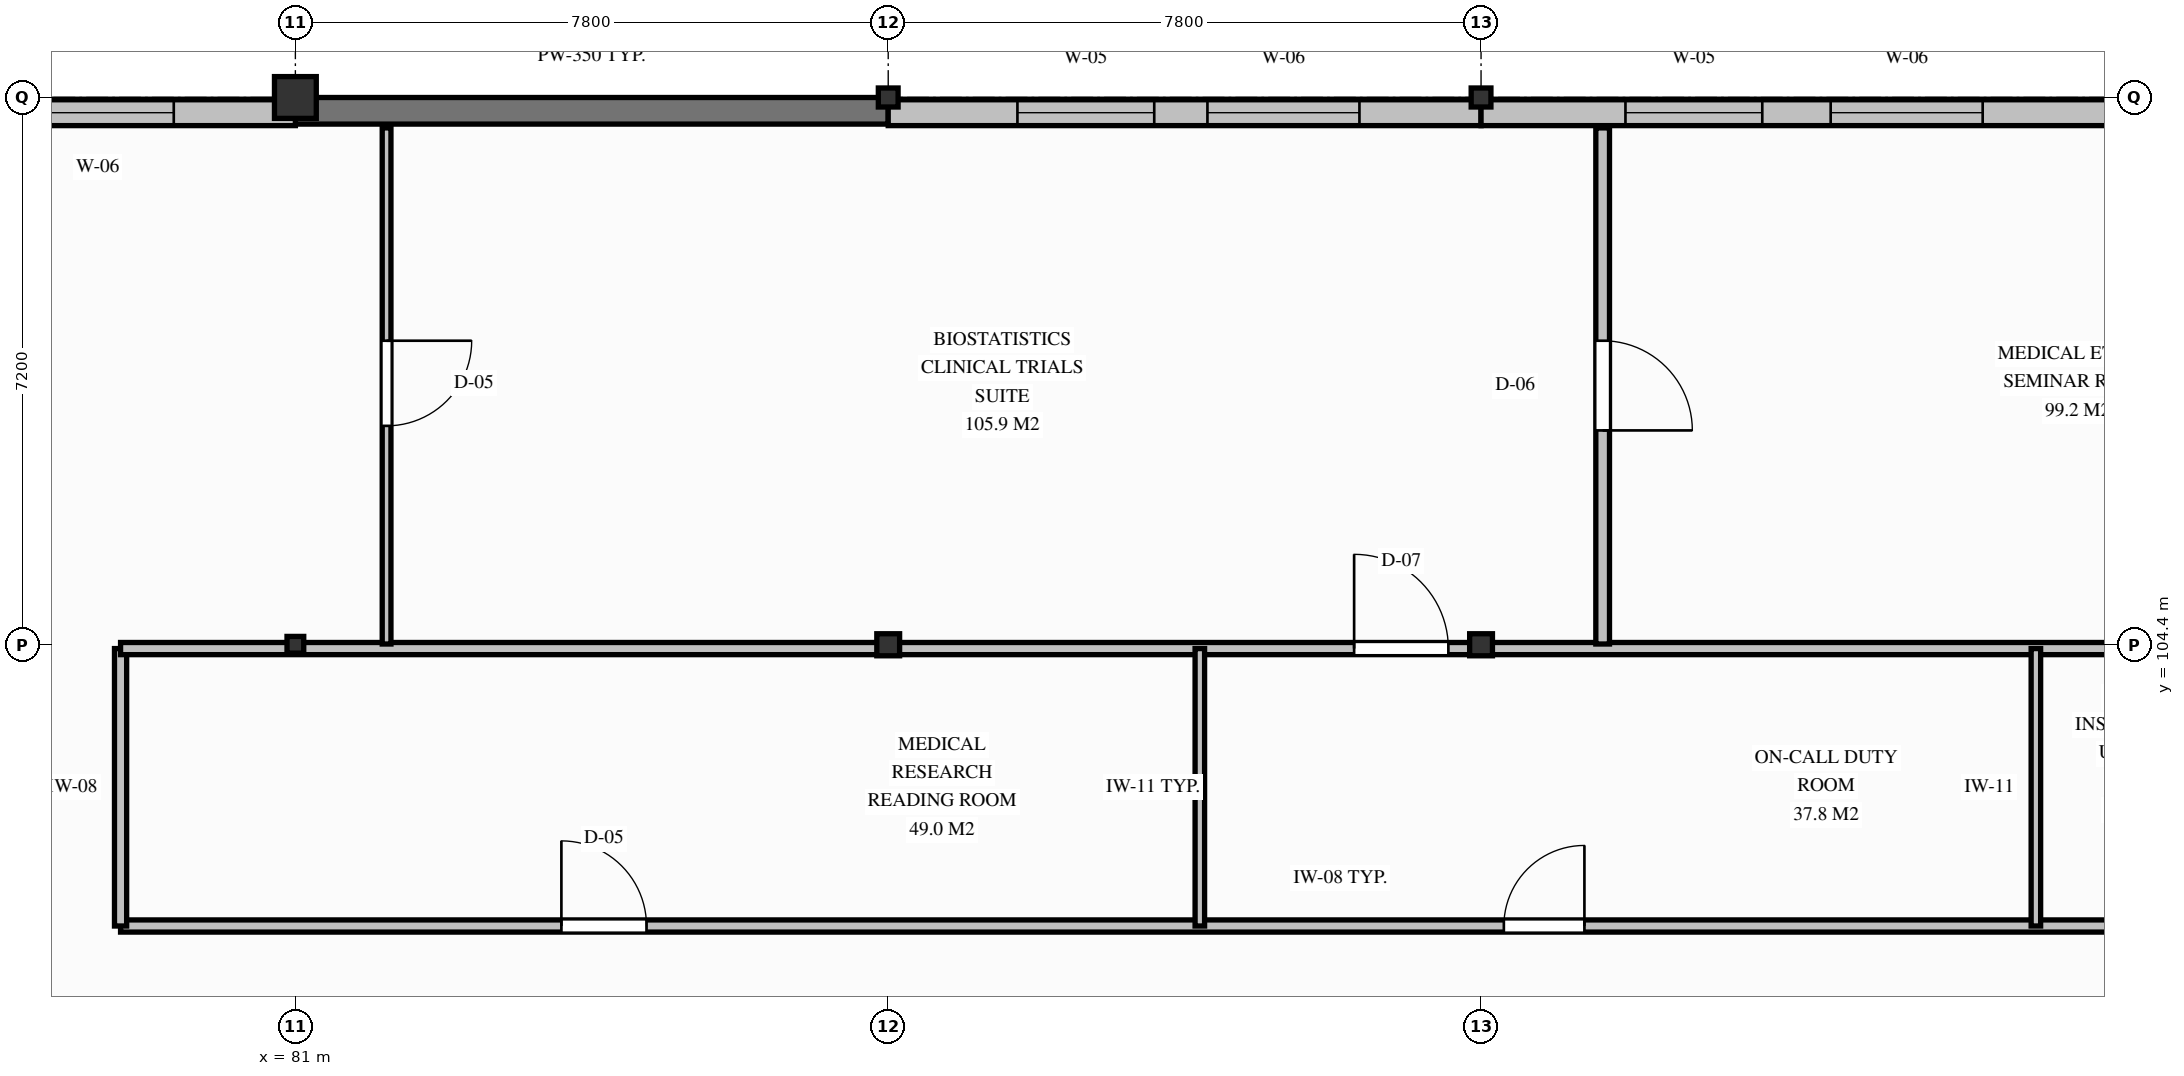
"""IFC4 building model, lengths in metres.
Left out: names, types, materials, properties, quantities, classifications, styles, units other than length and angle.
Written with IfcOpenShell. Run it as: python <this file> out.ifc"""

import sys

from ifc_helpers import new_model, si_unit, direction, frame, frame_2d, origin, origin_2d, place, context, subcontext, project, spatial, rectangle, hollow_rectangle, i_section, extrude, element, fill, save


model = new_model("IFC4")
c1 = context("Model", 3, precision=1e-05, world=origin(), true_north=direction((0.0, 1.0)))
c2 = subcontext(c1, "Body", "Model", "MODEL_VIEW")
j1 = project(units=[si_unit("LENGTHUNIT", "METRE"), si_unit("PLANEANGLEUNIT", "RADIAN")], contexts=[c1])
p1 = place(None, origin())
s1 = spatial("IfcSite", under=j1, at=p1, CompositionType="ELEMENT")
p2 = place(p1, origin())
s2 = spatial("IfcBuilding", under=s1, at=p2, CompositionType="ELEMENT")
p3 = place(p2, frame((0.0, 0.0, 25.35)))
s3 = spatial("IfcBuildingStorey", under=s2, at=p3, CompositionType="ELEMENT", Elevation=25.35)
p4 = place(p3, frame((81.0, 111.425, 0.0), z_axis=(0.0, 0.0, 1.0), x_axis=(1.0, 0.0, 0.0)))
e1 = element("IfcWall", 1, at=p4, inside=s3, PredefinedType="SHEAR", context=c2, shape_type="SweptSolid", body=[
    extrude(rectangle(XDim=7.8, YDim=0.35, at=frame_2d((3.9, 0.0))), origin(), (0.0, 0.0, 1.0), 4.05),
])
p5 = place(p3, frame((81.0, 104.4, 0.0), z_axis=(0.0, 0.0, 1.0), x_axis=(1.0, 0.0, 0.0)))
e2 = element("IfcColumn", 2, at=p5, inside=s3, PredefinedType="COLUMN", context=c2, shape_type="SweptSolid", body=[
    extrude(hollow_rectangle(XDim=0.22, YDim=0.22, WallThickness=0.012, InnerFilletRadius=0.019, OuterFilletRadius=0.031, at=origin_2d()), origin(), (0.0, 0.0, 1.0), 4.05),
])
p6 = place(p3, frame((81.0, 111.6, 0.0), z_axis=(0.0, 0.0, 1.0), x_axis=(1.0, 0.0, 0.0)))
e3 = element("IfcColumn", 3, at=p6, inside=s3, PredefinedType="COLUMN", context=c2, shape_type="SweptSolid", body=[
    extrude(rectangle(XDim=0.55, YDim=0.55, at=origin_2d()), origin(), (0.0, 0.0, 1.0), 4.05),
])
p7 = place(p3, frame((88.8, 104.4, 0.0), z_axis=(0.0, 0.0, 1.0), x_axis=(1.0, 0.0, 0.0)))
e4 = element("IfcColumn", 4, at=p7, inside=s3, PredefinedType="COLUMN", context=c2, shape_type="SweptSolid", body=[
    extrude(i_section(OverallWidth=0.3, OverallDepth=0.29, WebThickness=0.009, FlangeThickness=0.014, FilletRadius=0.027, at=origin_2d()), origin(), (0.0, 0.0, 1.0), 4.05),
])
p8 = place(p3, frame((88.8, 111.6, 0.0), z_axis=(0.0, 0.0, 1.0), x_axis=(1.0, 0.0, 0.0)))
e5 = element("IfcColumn", 5, at=p8, inside=s3, PredefinedType="COLUMN", context=c2, shape_type="SweptSolid", body=[
    extrude(i_section(OverallWidth=0.26, OverallDepth=0.25, WebThickness=0.008, FlangeThickness=0.012, FilletRadius=0.024, at=origin_2d()), origin(), (0.0, 0.0, 1.0), 4.05),
])
p9 = place(p3, frame((96.6, 104.4, 0.0), z_axis=(0.0, 0.0, 1.0), x_axis=(1.0, 0.0, 0.0)))
e6 = element("IfcColumn", 6, at=p9, inside=s3, PredefinedType="COLUMN", context=c2, shape_type="SweptSolid", body=[
    extrude(i_section(OverallWidth=0.3, OverallDepth=0.29, WebThickness=0.009, FlangeThickness=0.014, FilletRadius=0.027, at=origin_2d()), origin(), (0.0, 0.0, 1.0), 4.05),
])
p10 = place(p3, frame((96.6, 111.6, 0.0), z_axis=(0.0, 0.0, 1.0), x_axis=(1.0, 0.0, 0.0)))
e7 = element("IfcColumn", 7, at=p10, inside=s3, PredefinedType="COLUMN", context=c2, shape_type="SweptSolid", body=[
    extrude(i_section(OverallWidth=0.26, OverallDepth=0.25, WebThickness=0.008, FlangeThickness=0.012, FilletRadius=0.024, at=origin_2d()), origin(), (0.0, 0.0, 1.0), 4.05),
])
p11 = place(p3, frame((73.2, 111.4, 0.0), z_axis=(0.0, 0.0, 1.0), x_axis=(1.0, 0.0, 0.0)))
e8 = element("IfcWall", 8, at=p11, inside=s3, PredefinedType="SOLIDWALL", context=c2, shape_type="SweptSolid", body=[
    extrude(rectangle(XDim=7.8, YDim=0.34, at=frame_2d((3.9, 0.0))), origin(), (0.0, 0.0, 1.0), 3.188),
])
p12 = place(p11, frame((1.7, 0.0, 0.85)))
e9 = element("IfcOpeningElement", 9, at=p12, cuts=e8, PredefinedType="OPENING", context=c2, shape_type="SweptSolid", body=[
    extrude(rectangle(XDim=1.8, YDim=1.95, at=frame_2d((0.9, 0.975))), frame((0.0, 0.18, 0.0), z_axis=(0.0, -1.0, 0.0), x_axis=(1.0, 0.0, 0.0)), (0.0, 0.0, 1.0), 0.36),
])
p13 = place(p11, frame((4.2, 0.0, 0.85)))
e10 = element("IfcOpeningElement", 10, at=p13, cuts=e8, PredefinedType="OPENING", context=c2, shape_type="SweptSolid", body=[
    extrude(rectangle(XDim=2.0, YDim=1.95, at=frame_2d((1.0, 0.975))), frame((0.0, 0.18, 0.0), z_axis=(0.0, -1.0, 0.0), x_axis=(1.0, 0.0, 0.0)), (0.0, 0.0, 1.0), 0.36),
])
p14 = place(p3, frame((88.8, 111.4, 0.0), z_axis=(0.0, 0.0, 1.0), x_axis=(1.0, 0.0, 0.0)))
e11 = element("IfcWall", 11, at=p14, inside=s3, PredefinedType="SOLIDWALL", context=c2, shape_type="SweptSolid", body=[
    extrude(rectangle(XDim=7.8, YDim=0.34, at=frame_2d((3.9, 0.0))), origin(), (0.0, 0.0, 1.0), 3.338),
])
p15 = place(p14, frame((1.7, 0.0, 0.85)))
e12 = element("IfcOpeningElement", 12, at=p15, cuts=e11, PredefinedType="OPENING", context=c2, shape_type="SweptSolid", body=[
    extrude(rectangle(XDim=1.8, YDim=1.95, at=frame_2d((0.9, 0.975))), frame((0.0, 0.18, 0.0), z_axis=(0.0, -1.0, 0.0), x_axis=(1.0, 0.0, 0.0)), (0.0, 0.0, 1.0), 0.36),
])
p16 = place(p14, frame((4.2, 0.0, 0.85)))
e13 = element("IfcOpeningElement", 13, at=p16, cuts=e11, PredefinedType="OPENING", context=c2, shape_type="SweptSolid", body=[
    extrude(rectangle(XDim=2.0, YDim=1.95, at=frame_2d((1.0, 0.975))), frame((0.0, 0.18, 0.0), z_axis=(0.0, -1.0, 0.0), x_axis=(1.0, 0.0, 0.0)), (0.0, 0.0, 1.0), 0.36),
])
p17 = place(p3, frame((96.6, 111.4, 0.0), z_axis=(0.0, 0.0, 1.0), x_axis=(1.0, 0.0, 0.0)))
e14 = element("IfcWall", 14, at=p17, inside=s3, PredefinedType="SOLIDWALL", context=c2, shape_type="SweptSolid", body=[
    extrude(rectangle(XDim=8.4, YDim=0.34, at=frame_2d((4.2, 0.0))), origin(), (0.0, 0.0, 1.0), 3.388),
])
p18 = place(p17, frame((1.9, 0.0, 0.85)))
e15 = element("IfcOpeningElement", 15, at=p18, cuts=e14, PredefinedType="OPENING", context=c2, shape_type="SweptSolid", body=[
    extrude(rectangle(XDim=1.8, YDim=1.95, at=frame_2d((0.9, 0.975))), frame((0.0, 0.18, 0.0), z_axis=(0.0, -1.0, 0.0), x_axis=(1.0, 0.0, 0.0)), (0.0, 0.0, 1.0), 0.36),
])
p19 = place(p17, frame((4.6, 0.0, 0.85)))
e16 = element("IfcOpeningElement", 16, at=p19, cuts=e14, PredefinedType="OPENING", context=c2, shape_type="SweptSolid", body=[
    extrude(rectangle(XDim=2.0, YDim=1.95, at=frame_2d((1.0, 0.975))), frame((0.0, 0.18, 0.0), z_axis=(0.0, -1.0, 0.0), x_axis=(1.0, 0.0, 0.0)), (0.0, 0.0, 1.0), 0.36),
])
p20 = place(p3, frame((78.7, 100.7, 0.0), z_axis=(0.0, 0.0, 1.0), x_axis=(1.0, 0.0, 0.0)))
e17 = element("IfcWall", 17, at=p20, inside=s3, PredefinedType="PARTITIONING", context=c2, shape_type="SweptSolid", body=[
    extrude(rectangle(XDim=36.2, YDim=0.16, at=frame_2d((18.1, 0.0))), origin(), (0.0, 0.0, 1.0), 3.448),
])
p21 = place(p20, frame((5.8, 0.0, 0.0)))
e18 = element("IfcOpeningElement", 18, at=p21, cuts=e17, PredefinedType="OPENING", context=c2, shape_type="SweptSolid", body=[
    extrude(rectangle(XDim=1.12, YDim=2.18, at=frame_2d((0.56, 1.09))), frame((0.0, 0.09, 0.0), z_axis=(0.0, -1.0, 0.0), x_axis=(1.0, 0.0, 0.0)), (0.0, 0.0, 1.0), 0.18),
])
p22 = place(p20, frame((18.2, 0.0, 0.0)))
e19 = element("IfcOpeningElement", 19, at=p22, cuts=e17, PredefinedType="OPENING", context=c2, shape_type="SweptSolid", body=[
    extrude(rectangle(XDim=1.06, YDim=2.16, at=frame_2d((0.53, 1.08))), frame((0.0, 0.09, 0.0), z_axis=(0.0, -1.0, 0.0), x_axis=(1.0, 0.0, 0.0)), (0.0, 0.0, 1.0), 0.18),
])
p23 = place(p20, frame((29.2, 0.0, 0.0)))
e20 = element("IfcOpeningElement", 20, at=p23, cuts=e17, PredefinedType="OPENING", context=c2, shape_type="SweptSolid", body=[
    extrude(rectangle(XDim=1.36, YDim=2.2, at=frame_2d((0.68, 1.1))), frame((0.0, 0.09, 0.0), z_axis=(0.0, -1.0, 0.0), x_axis=(1.0, 0.0, 0.0)), (0.0, 0.0, 1.0), 0.18),
])
p24 = place(p3, frame((78.7, 100.7, 0.0), z_axis=(0.0, 0.0, 1.0), x_axis=(0.0, 1.0, 0.0)))
e21 = element("IfcWall", 21, at=p24, inside=s3, PredefinedType="PARTITIONING", context=c2, shape_type="SweptSolid", body=[
    extrude(rectangle(XDim=3.65, YDim=0.16, at=frame_2d((1.825, 0.0))), origin(), (0.0, 0.0, 1.0), 3.388),
])
p25 = place(p3, frame((78.7, 104.35, 0.0), z_axis=(0.0, 0.0, 1.0), x_axis=(1.0, 0.0, 0.0)))
e22 = element("IfcWall", 22, at=p25, inside=s3, PredefinedType="PARTITIONING", context=c2, shape_type="SweptSolid", body=[
    extrude(rectangle(XDim=36.2, YDim=0.16, at=frame_2d((18.1, 0.0))), origin(), (0.0, 0.0, 1.0), 3.188),
])
p26 = place(p25, frame((16.23, 0.0, 0.0)))
e23 = element("IfcOpeningElement", 23, at=p26, cuts=e22, PredefinedType="OPENING", context=c2, shape_type="SweptSolid", body=[
    extrude(rectangle(XDim=1.24, YDim=2.2, at=frame_2d((0.62, 1.1))), frame((0.0, 0.09, 0.0), z_axis=(0.0, -1.0, 0.0), x_axis=(1.0, 0.0, 0.0)), (0.0, 0.0, 1.0), 0.18),
])
p27 = place(p3, frame((92.9, 100.7, 0.0), z_axis=(0.0, 0.0, 1.0), x_axis=(0.0, 1.0, 0.0)))
e24 = element("IfcWall", 24, at=p27, inside=s3, PredefinedType="PARTITIONING", context=c2, shape_type="SweptSolid", body=[
    extrude(rectangle(XDim=3.65, YDim=0.125, at=frame_2d((1.825, 0.0))), origin(), (0.0, 0.0, 1.0), 3.398),
])
p28 = place(p3, frame((103.9, 100.7, 0.0), z_axis=(0.0, 0.0, 1.0), x_axis=(0.0, 1.0, 0.0)))
e25 = element("IfcWall", 25, at=p28, inside=s3, PredefinedType="PARTITIONING", context=c2, shape_type="SweptSolid", body=[
    extrude(rectangle(XDim=3.65, YDim=0.125, at=frame_2d((1.825, 0.0))), origin(), (0.0, 0.0, 1.0), 3.458),
])
p29 = place(p3, frame((82.2, 111.2, 0.0), z_axis=(0.0, 0.0, 1.0), x_axis=(0.0, -1.0, 0.0)))
e26 = element("IfcWall", 26, at=p29, inside=s3, PredefinedType="PARTITIONING", context=c2, shape_type="SweptSolid", body=[
    extrude(rectangle(XDim=6.79, YDim=0.115, at=frame_2d((3.395, 0.0))), origin(), (0.0, 0.0, 1.0), 3.348),
])
p30 = place(p29, frame((2.8, 0.0, 0.0)))
e27 = element("IfcOpeningElement", 27, at=p30, cuts=e26, PredefinedType="OPENING", context=c2, shape_type="SweptSolid", body=[
    extrude(rectangle(XDim=1.12, YDim=2.18, at=frame_2d((0.56, 1.09))), frame((0.0, 0.067, 0.0), z_axis=(0.0, -1.0, 0.0), x_axis=(1.0, 0.0, 0.0)), (0.0, 0.0, 1.0), 0.135),
])
p31 = place(p3, frame((98.2, 111.2, 0.0), z_axis=(0.0, 0.0, 1.0), x_axis=(0.0, -1.0, 0.0)))
e28 = element("IfcWall", 28, at=p31, inside=s3, PredefinedType="PARTITIONING", context=c2, shape_type="SweptSolid", body=[
    extrude(rectangle(XDim=6.79, YDim=0.18, at=frame_2d((3.395, 0.0))), origin(), (0.0, 0.0, 1.0), 3.458),
])
p32 = place(p31, frame((2.8, 0.0, 0.0)))
e29 = element("IfcOpeningElement", 29, at=p32, cuts=e28, PredefinedType="OPENING", context=c2, shape_type="SweptSolid", body=[
    extrude(rectangle(XDim=1.18, YDim=2.2, at=frame_2d((0.59, 1.1))), frame((0.0, 0.1, 0.0), z_axis=(0.0, -1.0, 0.0), x_axis=(1.0, 0.0, 0.0)), (0.0, 0.0, 1.0), 0.2),
])
p33 = place(p13, origin())
e30 = element("IfcWindow", 30, at=p33, inside=s3, PartitioningType="SINGLE_PANEL", PredefinedType="WINDOW", context=c2, shape_type="SweptSolid", body=[
    extrude(rectangle(XDim=2.0, YDim=1.95, at=frame_2d((1.0, 0.975))), frame((0.0, 0.03, 0.0), z_axis=(0.0, -1.0, 0.0), x_axis=(1.0, 0.0, 0.0)), (0.0, 0.0, 1.0), 0.06),
])
fill(e10, e30)
p34 = place(p15, origin())
e31 = element("IfcWindow", 31, at=p34, inside=s3, PartitioningType="SINGLE_PANEL", PredefinedType="WINDOW", context=c2, shape_type="SweptSolid", body=[
    extrude(rectangle(XDim=1.8, YDim=1.95, at=frame_2d((0.9, 0.975))), frame((0.0, 0.03, 0.0), z_axis=(0.0, -1.0, 0.0), x_axis=(1.0, 0.0, 0.0)), (0.0, 0.0, 1.0), 0.06),
])
fill(e12, e31)
p35 = place(p16, origin())
e32 = element("IfcWindow", 32, at=p35, inside=s3, PartitioningType="SINGLE_PANEL", PredefinedType="WINDOW", context=c2, shape_type="SweptSolid", body=[
    extrude(rectangle(XDim=2.0, YDim=1.95, at=frame_2d((1.0, 0.975))), frame((0.0, 0.03, 0.0), z_axis=(0.0, -1.0, 0.0), x_axis=(1.0, 0.0, 0.0)), (0.0, 0.0, 1.0), 0.06),
])
fill(e13, e32)
p36 = place(p18, origin())
e33 = element("IfcWindow", 33, at=p36, inside=s3, PartitioningType="SINGLE_PANEL", PredefinedType="WINDOW", context=c2, shape_type="SweptSolid", body=[
    extrude(rectangle(XDim=1.8, YDim=1.95, at=frame_2d((0.9, 0.975))), frame((0.0, 0.03, 0.0), z_axis=(0.0, -1.0, 0.0), x_axis=(1.0, 0.0, 0.0)), (0.0, 0.0, 1.0), 0.06),
])
fill(e15, e33)
p37 = place(p19, origin())
e34 = element("IfcWindow", 34, at=p37, inside=s3, PartitioningType="SINGLE_PANEL", PredefinedType="WINDOW", context=c2, shape_type="SweptSolid", body=[
    extrude(rectangle(XDim=2.0, YDim=1.95, at=frame_2d((1.0, 0.975))), frame((0.0, 0.03, 0.0), z_axis=(0.0, -1.0, 0.0), x_axis=(1.0, 0.0, 0.0)), (0.0, 0.0, 1.0), 0.06),
])
fill(e16, e34)
p38 = place(p21, origin())
e35 = element("IfcDoor", 35, at=p38, inside=s3, OperationType="SINGLE_SWING_LEFT", PredefinedType="DOOR", context=c2, shape_type="SweptSolid", body=[
    extrude(rectangle(XDim=1.12, YDim=2.18, at=frame_2d((0.56, 1.09))), frame((0.0, 0.025, 0.0), z_axis=(0.0, -1.0, 0.0), x_axis=(1.0, 0.0, 0.0)), (0.0, 0.0, 1.0), 0.05),
])
fill(e18, e35)
p39 = place(p22, origin())
e36 = element("IfcDoor", 36, at=p39, inside=s3, OperationType="SINGLE_SWING_RIGHT", PredefinedType="DOOR", context=c2, shape_type="SweptSolid", body=[
    extrude(rectangle(XDim=1.06, YDim=2.16, at=frame_2d((0.53, 1.08))), frame((0.0, 0.025, 0.0), z_axis=(0.0, -1.0, 0.0), x_axis=(1.0, 0.0, 0.0)), (0.0, 0.0, 1.0), 0.05),
])
fill(e19, e36)
p40 = place(p30, origin())
e37 = element("IfcDoor", 37, at=p40, inside=s3, OperationType="SINGLE_SWING_LEFT", PredefinedType="DOOR", context=c2, shape_type="SweptSolid", body=[
    extrude(rectangle(XDim=1.12, YDim=2.18, at=frame_2d((0.56, 1.09))), frame((0.0, 0.025, 0.0), z_axis=(0.0, -1.0, 0.0), x_axis=(1.0, 0.0, 0.0)), (0.0, 0.0, 1.0), 0.05),
])
fill(e27, e37)
p41 = place(p32, origin())
e38 = element("IfcDoor", 38, at=p41, inside=s3, OperationType="SINGLE_SWING_RIGHT", PredefinedType="DOOR", context=c2, shape_type="SweptSolid", body=[
    extrude(rectangle(XDim=1.18, YDim=2.2, at=frame_2d((0.59, 1.1))), frame((0.0, 0.025, 0.0), z_axis=(0.0, -1.0, 0.0), x_axis=(1.0, 0.0, 0.0)), (0.0, 0.0, 1.0), 0.05),
])
fill(e29, e38)
p42 = place(p26, origin())
e39 = element("IfcDoor", 39, at=p42, inside=s3, OperationType="SINGLE_SWING_LEFT", PredefinedType="DOOR", context=c2, shape_type="SweptSolid", body=[
    extrude(rectangle(XDim=1.24, YDim=2.2, at=frame_2d((0.62, 1.1))), frame((0.0, 0.025, 0.0), z_axis=(0.0, -1.0, 0.0), x_axis=(1.0, 0.0, 0.0)), (0.0, 0.0, 1.0), 0.05),
])
fill(e23, e39)
save(model, sys.argv[1])
